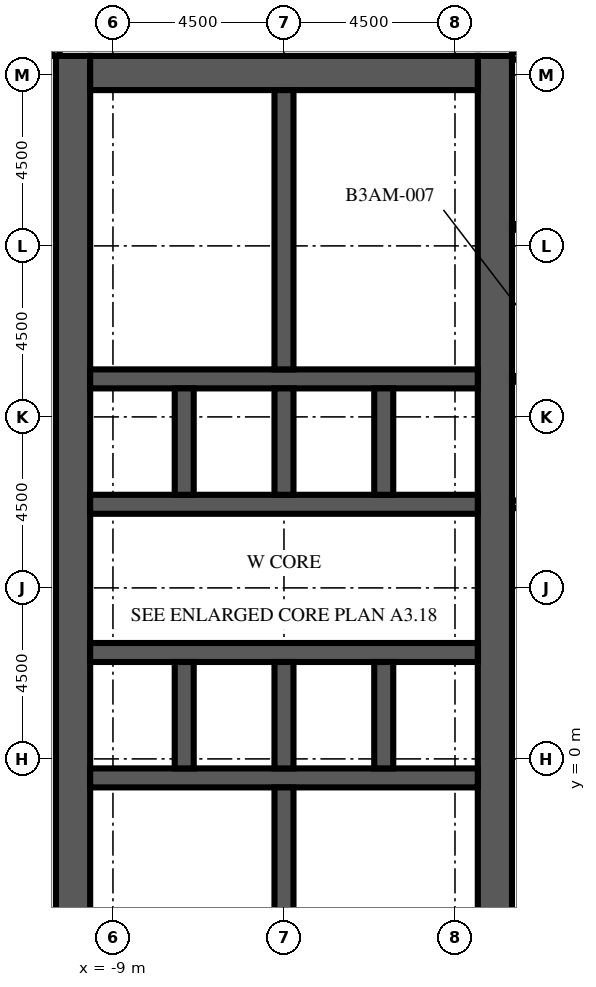
"""IFC4 building model, lengths in metres.
Left out: names, types, materials, properties, quantities, classifications, styles, units other than length and angle.
Written with IfcOpenShell. Run it as: python <this file> out.ifc"""

import sys

from ifc_helpers import new_model, si_unit, direction, frame, frame_2d, origin, place, context, subcontext, project, spatial, rectangle, extrude, element, fill, save


model = new_model("IFC4")
c1 = context("Model", 3, precision=1e-05, world=origin(), true_north=direction((0.0, 1.0)))
c2 = subcontext(c1, "Body", "Model", "MODEL_VIEW")
j1 = project(units=[si_unit("LENGTHUNIT", "METRE"), si_unit("PLANEANGLEUNIT", "RADIAN")], contexts=[c1])
p1 = place(None, origin())
s1 = spatial("IfcSite", under=j1, at=p1, CompositionType="ELEMENT")
p2 = place(p1, origin())
s2 = spatial("IfcBuilding", under=s1, at=p2, CompositionType="ELEMENT")
p3 = place(p2, frame((0.0, 0.0, 110.7)))
s3 = spatial("IfcBuildingStorey", under=s2, at=p3, CompositionType="ELEMENT", Elevation=110.7)
p4 = place(p3, frame((-10.05, -9.0, 0.0), z_axis=(0.0, 0.0, 1.0), x_axis=(0.0, 1.0, 0.0)))
e1 = element("IfcWall", 1, at=p4, inside=s3, PredefinedType="SHEAR", context=c2, shape_type="SweptSolid", body=[
    extrude(rectangle(XDim=27.5, YDim=0.9, at=frame_2d((13.75, 0.0))), origin(), (0.0, 0.0, 1.0), 6.0),
])
p5 = place(p4, frame((12.55, 0.0, 0.0)))
e2 = element("IfcOpeningElement", 2, at=p5, cuts=e1, PredefinedType="OPENING", context=c2, shape_type="SweptSolid", body=[
    extrude(rectangle(XDim=2.4, YDim=2.4, at=frame_2d((1.2, 1.2))), frame((0.0, 0.46, 0.0), z_axis=(0.0, -1.0, 0.0), x_axis=(1.0, 0.0, 0.0)), (0.0, 0.0, 1.0), 0.92),
])
p6 = place(p4, frame((6.825, 0.0, 0.0)))
e3 = element("IfcOpeningElement", 3, at=p6, cuts=e1, PredefinedType="OPENING", context=c2, shape_type="SweptSolid", body=[
    extrude(rectangle(XDim=1.2, YDim=2.1, at=frame_2d((0.6, 1.05))), frame((0.0, 0.46, 0.0), z_axis=(0.0, -1.0, 0.0), x_axis=(1.0, 0.0, 0.0)), (0.0, 0.0, 1.0), 0.92),
])
p7 = place(p4, frame((19.475, 0.0, 0.0)))
e4 = element("IfcOpeningElement", 4, at=p7, cuts=e1, PredefinedType="OPENING", context=c2, shape_type="SweptSolid", body=[
    extrude(rectangle(XDim=1.2, YDim=2.1, at=frame_2d((0.6, 1.05))), frame((0.0, 0.46, 0.0), z_axis=(0.0, -1.0, 0.0), x_axis=(1.0, 0.0, 0.0)), (0.0, 0.0, 1.0), 0.92),
])
p8 = place(p3, frame((1.05, -9.0, 0.0), z_axis=(0.0, 0.0, 1.0), x_axis=(0.0, 1.0, 0.0)))
e5 = element("IfcWall", 5, at=p8, inside=s3, PredefinedType="SHEAR", context=c2, shape_type="SweptSolid", body=[
    extrude(rectangle(XDim=27.5, YDim=0.9, at=frame_2d((13.75, 0.0))), origin(), (0.0, 0.0, 1.0), 6.0),
])
p9 = place(p8, frame((12.55, 0.0, 0.0)))
e6 = element("IfcOpeningElement", 6, at=p9, cuts=e5, PredefinedType="OPENING", context=c2, shape_type="SweptSolid", body=[
    extrude(rectangle(XDim=2.4, YDim=2.4, at=frame_2d((1.2, 1.2))), frame((0.0, 0.46, 0.0), z_axis=(0.0, -1.0, 0.0), x_axis=(1.0, 0.0, 0.0)), (0.0, 0.0, 1.0), 0.92),
])
p10 = place(p8, frame((3.975, 0.0, 0.0)))
e7 = element("IfcOpeningElement", 7, at=p10, cuts=e5, PredefinedType="OPENING", context=c2, shape_type="SweptSolid", body=[
    extrude(rectangle(XDim=1.2, YDim=2.1, at=frame_2d((0.6, 1.05))), frame((0.0, 0.46, 0.0), z_axis=(0.0, -1.0, 0.0), x_axis=(1.0, 0.0, 0.0)), (0.0, 0.0, 1.0), 0.92),
])
p11 = place(p8, frame((19.485, 0.0, 0.0)))
e8 = element("IfcOpeningElement", 8, at=p11, cuts=e5, PredefinedType="OPENING", context=c2, shape_type="SweptSolid", body=[
    extrude(rectangle(XDim=1.0, YDim=2.1, at=frame_2d((0.5, 1.05))), frame((0.0, 0.46, 0.0), z_axis=(0.0, -1.0, 0.0), x_axis=(1.0, 0.0, 0.0)), (0.0, 0.0, 1.0), 0.92),
])
p12 = place(p8, frame((21.139, 0.0, 0.0)))
e9 = element("IfcOpeningElement", 9, at=p12, cuts=e5, PredefinedType="OPENING", context=c2, shape_type="SweptSolid", body=[
    extrude(rectangle(XDim=1.0, YDim=2.1, at=frame_2d((0.5, 1.05))), frame((0.0, 0.46, 0.0), z_axis=(0.0, -1.0, 0.0), x_axis=(1.0, 0.0, 0.0)), (0.0, 0.0, 1.0), 0.92),
])
p13 = place(p8, frame((23.16, 0.0, 0.0)))
e10 = element("IfcOpeningElement", 10, at=p13, cuts=e5, PredefinedType="OPENING", context=c2, shape_type="SweptSolid", body=[
    extrude(rectangle(XDim=1.0, YDim=2.1, at=frame_2d((0.5, 1.05))), frame((0.0, 0.46, 0.0), z_axis=(0.0, -1.0, 0.0), x_axis=(1.0, 0.0, 0.0)), (0.0, 0.0, 1.0), 0.92),
])
p14 = place(p8, frame((25.181, 0.0, 0.0)))
e11 = element("IfcOpeningElement", 11, at=p14, cuts=e5, PredefinedType="OPENING", context=c2, shape_type="SweptSolid", body=[
    extrude(rectangle(XDim=1.0, YDim=2.1, at=frame_2d((0.5, 1.05))), frame((0.0, 0.46, 0.0), z_axis=(0.0, -1.0, 0.0), x_axis=(1.0, 0.0, 0.0)), (0.0, 0.0, 1.0), 0.92),
])
p15 = place(p3, frame((-9.6, 18.05, 0.0), z_axis=(0.0, 0.0, 1.0), x_axis=(1.0, 0.0, 0.0)))
e12 = element("IfcWall", 12, at=p15, inside=s3, PredefinedType="SHEAR", context=c2, shape_type="SweptSolid", body=[
    extrude(rectangle(XDim=10.2, YDim=0.9, at=frame_2d((5.1, 0.0))), origin(), (0.0, 0.0, 1.0), 6.0),
])
p16 = place(p3, frame((-9.6, -0.5, 0.0), z_axis=(0.0, 0.0, 1.0), x_axis=(1.0, 0.0, 0.0)))
e13 = element("IfcWall", 13, at=p16, inside=s3, PredefinedType="SHEAR", context=c2, shape_type="SweptSolid", body=[
    extrude(rectangle(XDim=10.2, YDim=0.5, at=frame_2d((5.1, 0.0))), origin(), (0.0, 0.0, 1.0), 6.0),
])
p17 = place(p3, frame((-9.6, 2.8, 0.0), z_axis=(0.0, 0.0, 1.0), x_axis=(1.0, 0.0, 0.0)))
e14 = element("IfcWall", 14, at=p17, inside=s3, PredefinedType="SHEAR", context=c2, shape_type="SweptSolid", body=[
    extrude(rectangle(XDim=10.2, YDim=0.5, at=frame_2d((5.1, 0.0))), origin(), (0.0, 0.0, 1.0), 6.0),
])
p18 = place(p17, frame((0.562, 0.0, 0.0)))
e15 = element("IfcOpeningElement", 15, at=p18, cuts=e14, PredefinedType="OPENING", context=c2, shape_type="SweptSolid", body=[
    extrude(rectangle(XDim=1.1, YDim=2.1, at=frame_2d((0.55, 1.05))), frame((0.0, 0.26, 0.0), z_axis=(0.0, -1.0, 0.0), x_axis=(1.0, 0.0, 0.0)), (0.0, 0.0, 1.0), 0.52),
])
p19 = place(p17, frame((3.238, 0.0, 0.0)))
e16 = element("IfcOpeningElement", 16, at=p19, cuts=e14, PredefinedType="OPENING", context=c2, shape_type="SweptSolid", body=[
    extrude(rectangle(XDim=1.1, YDim=2.1, at=frame_2d((0.55, 1.05))), frame((0.0, 0.26, 0.0), z_axis=(0.0, -1.0, 0.0), x_axis=(1.0, 0.0, 0.0)), (0.0, 0.0, 1.0), 0.52),
])
p20 = place(p17, frame((8.538, 0.0, 0.0)))
e17 = element("IfcOpeningElement", 17, at=p20, cuts=e14, PredefinedType="OPENING", context=c2, shape_type="SweptSolid", body=[
    extrude(rectangle(XDim=1.1, YDim=2.1, at=frame_2d((0.55, 1.05))), frame((0.0, 0.26, 0.0), z_axis=(0.0, -1.0, 0.0), x_axis=(1.0, 0.0, 0.0)), (0.0, 0.0, 1.0), 0.52),
])
p21 = place(p3, frame((-9.6, 6.7, 0.0), z_axis=(0.0, 0.0, 1.0), x_axis=(1.0, 0.0, 0.0)))
e18 = element("IfcWall", 18, at=p21, inside=s3, PredefinedType="SHEAR", context=c2, shape_type="SweptSolid", body=[
    extrude(rectangle(XDim=10.2, YDim=0.5, at=frame_2d((5.1, 0.0))), origin(), (0.0, 0.0, 1.0), 6.0),
])
p22 = place(p21, frame((0.562, 0.0, 0.0)))
e19 = element("IfcOpeningElement", 19, at=p22, cuts=e18, PredefinedType="OPENING", context=c2, shape_type="SweptSolid", body=[
    extrude(rectangle(XDim=1.1, YDim=2.1, at=frame_2d((0.55, 1.05))), frame((0.0, 0.26, 0.0), z_axis=(0.0, -1.0, 0.0), x_axis=(1.0, 0.0, 0.0)), (0.0, 0.0, 1.0), 0.52),
])
p23 = place(p21, frame((3.288, 0.0, 0.0)))
e20 = element("IfcOpeningElement", 20, at=p23, cuts=e18, PredefinedType="OPENING", context=c2, shape_type="SweptSolid", body=[
    extrude(rectangle(XDim=1.0, YDim=2.1, at=frame_2d((0.5, 1.05))), frame((0.0, 0.26, 0.0), z_axis=(0.0, -1.0, 0.0), x_axis=(1.0, 0.0, 0.0)), (0.0, 0.0, 1.0), 0.52),
])
p24 = place(p21, frame((5.913, 0.0, 0.0)))
e21 = element("IfcOpeningElement", 21, at=p24, cuts=e18, PredefinedType="OPENING", context=c2, shape_type="SweptSolid", body=[
    extrude(rectangle(XDim=1.0, YDim=2.1, at=frame_2d((0.5, 1.05))), frame((0.0, 0.26, 0.0), z_axis=(0.0, -1.0, 0.0), x_axis=(1.0, 0.0, 0.0)), (0.0, 0.0, 1.0), 0.52),
])
p25 = place(p21, frame((8.587, 0.0, 0.0)))
e22 = element("IfcOpeningElement", 22, at=p25, cuts=e18, PredefinedType="OPENING", context=c2, shape_type="SweptSolid", body=[
    extrude(rectangle(XDim=1.0, YDim=2.1, at=frame_2d((0.5, 1.05))), frame((0.0, 0.26, 0.0), z_axis=(0.0, -1.0, 0.0), x_axis=(1.0, 0.0, 0.0)), (0.0, 0.0, 1.0), 0.52),
])
p26 = place(p3, frame((-9.6, 10.0, 0.0), z_axis=(0.0, 0.0, 1.0), x_axis=(1.0, 0.0, 0.0)))
e23 = element("IfcWall", 23, at=p26, inside=s3, PredefinedType="SHEAR", context=c2, shape_type="SweptSolid", body=[
    extrude(rectangle(XDim=10.2, YDim=0.5, at=frame_2d((5.1, 0.0))), origin(), (0.0, 0.0, 1.0), 6.0),
])
for number, where, z_axis, x_axis in (
    (24, (-7.125, -0.25, 0.0), (0.0, 0.0, 1.0), (0.0, 1.0, 0.0)),
    (25, (-7.125, 6.95, 0.0), (0.0, 0.0, 1.0), (0.0, 1.0, 0.0)),
    (26, (-4.5, -0.25, 0.0), (0.0, 0.0, 1.0), (0.0, 1.0, 0.0)),
    (27, (-4.5, 6.95, 0.0), (0.0, 0.0, 1.0), (0.0, 1.0, 0.0)),
    (28, (-1.875, -0.25, 0.0), (0.0, 0.0, 1.0), (0.0, 1.0, 0.0)),
    (29, (-1.875, 6.95, 0.0), (0.0, 0.0, 1.0), (0.0, 1.0, 0.0)),
):
    element("IfcWall", number, at=place(p3, frame(where, z_axis=z_axis, x_axis=x_axis)), inside=s3, PredefinedType="SHEAR", context=c2, shape_type="SweptSolid", body=[
        extrude(rectangle(XDim=2.8, YDim=0.5, at=frame_2d((1.4, 0.0))), origin(), (0.0, 0.0, 1.0), 6.0),
    ])
for number, where, z_axis, x_axis in (
    (30, (-4.5, -8.1, 0.0), (0.0, 0.0, 1.0), (0.0, 1.0, 0.0)),
    (31, (-4.5, 10.25, 0.0), (0.0, 0.0, 1.0), (0.0, 1.0, 0.0)),
):
    element("IfcWall", number, at=place(p3, frame(where, z_axis=z_axis, x_axis=x_axis)), inside=s3, PredefinedType="SHEAR", context=c2, shape_type="SweptSolid", body=[
        extrude(rectangle(XDim=7.35, YDim=0.5, at=frame_2d((3.675, 0.0))), origin(), (0.0, 0.0, 1.0), 6.0),
    ])
p27 = place(p3, frame((-1.0, -2.955, 0.0), z_axis=(0.0, 0.0, 1.0), x_axis=(1.0, 0.0, 0.0)))
e32 = element("IfcWall", 32, at=p27, inside=s3, PredefinedType="PARTITIONING", context=c2, shape_type="SweptSolid", body=[
    extrude(rectangle(XDim=1.6, YDim=0.1, at=frame_2d((0.8, 0.0))), origin(), (0.0, 0.0, 1.0), 5.55),
])
p28 = place(p27, frame((0.3, 0.0, 0.0)))
e33 = element("IfcOpeningElement", 33, at=p28, cuts=e32, PredefinedType="OPENING", context=c2, shape_type="SweptSolid", body=[
    extrude(rectangle(XDim=1.0, YDim=2.1, at=frame_2d((0.5, 1.05))), frame((0.0, 0.06, 0.0), z_axis=(0.0, -1.0, 0.0), x_axis=(1.0, 0.0, 0.0)), (0.0, 0.0, 1.0), 0.12),
])
p29 = place(p3, frame((-1.0, -5.895, 0.0), z_axis=(0.0, 0.0, 1.0), x_axis=(0.0, 1.0, 0.0)))
e34 = element("IfcWall", 34, at=p29, inside=s3, PredefinedType="PARTITIONING", context=c2, shape_type="SweptSolid", body=[
    extrude(rectangle(XDim=2.94, YDim=0.1, at=frame_2d((1.47, 0.0))), origin(), (0.0, 0.0, 1.0), 5.55),
])
p30 = place(p29, frame((0.97, 0.0, 0.0)))
e35 = element("IfcOpeningElement", 35, at=p30, cuts=e34, PredefinedType="OPENING", context=c2, shape_type="SweptSolid", body=[
    extrude(rectangle(XDim=1.0, YDim=2.1, at=frame_2d((0.5, 1.05))), frame((0.0, 0.06, 0.0), z_axis=(0.0, -1.0, 0.0), x_axis=(1.0, 0.0, 0.0)), (0.0, 0.0, 1.0), 0.12),
])
p31 = place(p3, frame((-4.25, -2.955, 0.0), z_axis=(0.0, 0.0, 1.0), x_axis=(1.0, 0.0, 0.0)))
e36 = element("IfcWall", 36, at=p31, inside=s3, PredefinedType="PARTITIONING", context=c2, shape_type="SweptSolid", body=[
    extrude(rectangle(XDim=3.25, YDim=0.1, at=frame_2d((1.625, 0.0))), origin(), (0.0, 0.0, 1.0), 5.55),
])
for number, where, z_axis, x_axis in (
    (37, (-4.25, 11.72, 0.0), (0.0, 0.0, 1.0), (1.0, 0.0, 0.0)),
    (38, (-4.25, 13.558, 0.0), (0.0, 0.0, 1.0), (1.0, 0.0, 0.0)),
    (39, (-4.25, 15.762, 0.0), (0.0, 0.0, 1.0), (1.0, 0.0, 0.0)),
):
    element("IfcWall", number, at=place(p3, frame(where, z_axis=z_axis, x_axis=x_axis)), inside=s3, PredefinedType="PARTITIONING", context=c2, shape_type="SweptSolid", body=[
        extrude(rectangle(XDim=4.85, YDim=0.1, at=frame_2d((2.425, 0.0))), origin(), (0.0, 0.0, 1.0), 5.55),
    ])
p32 = place(p3, frame((-10.5, 26.55, 0.0), z_axis=(0.0, 0.0, 1.0), x_axis=(0.0, -1.0, 0.0)))
e40 = element("IfcWall", 40, at=p32, inside=s3, PredefinedType="PARTITIONING", context=c2, shape_type="SweptSolid", body=[
    extrude(rectangle(XDim=8.05, YDim=0.2, at=frame_2d((4.025, 0.0))), origin(), (0.0, 0.0, 1.0), 5.55),
])
p33 = place(p32, frame((0.45, 0.0, 0.0)))
e41 = element("IfcOpeningElement", 41, at=p33, cuts=e40, PredefinedType="OPENING", context=c2, shape_type="SweptSolid", body=[
    extrude(rectangle(XDim=1.0, YDim=2.1, at=frame_2d((0.5, 1.05))), frame((0.0, 0.11, 0.0), z_axis=(0.0, -1.0, 0.0), x_axis=(1.0, 0.0, 0.0)), (0.0, 0.0, 1.0), 0.22),
])
p34 = place(p3, frame((1.5, 6.7, 0.0), z_axis=(0.0, 0.0, 1.0), x_axis=(1.0, 0.0, 0.0)))
e42 = element("IfcWall", 42, at=p34, inside=s3, PredefinedType="PARTITIONING", context=c2, shape_type="SweptSolid", body=[
    extrude(rectangle(XDim=4.5, YDim=0.2, at=frame_2d((2.25, 0.0))), origin(), (0.0, 0.0, 1.0), 5.55),
])
p35 = place(p34, frame((2.35, 0.0, 0.0)))
e43 = element("IfcOpeningElement", 43, at=p35, cuts=e42, PredefinedType="OPENING", context=c2, shape_type="SweptSolid", body=[
    extrude(rectangle(XDim=1.0, YDim=2.1, at=frame_2d((0.5, 1.05))), frame((0.0, 0.11, 0.0), z_axis=(0.0, -1.0, 0.0), x_axis=(1.0, 0.0, 0.0)), (0.0, 0.0, 1.0), 0.22),
])
p36 = place(p3, frame((1.5, 10.0, 0.0), z_axis=(0.0, 0.0, 1.0), x_axis=(1.0, 0.0, 0.0)))
e44 = element("IfcWall", 44, at=p36, inside=s3, PredefinedType="PARTITIONING", context=c2, shape_type="SweptSolid", body=[
    extrude(rectangle(XDim=4.5, YDim=0.15, at=frame_2d((2.25, 0.0))), origin(), (0.0, 0.0, 1.0), 5.55),
])
p37 = place(p36, frame((1.1, 0.0, 0.0)))
e45 = element("IfcOpeningElement", 45, at=p37, cuts=e44, PredefinedType="OPENING", context=c2, shape_type="SweptSolid", body=[
    extrude(rectangle(XDim=1.0, YDim=2.1, at=frame_2d((0.5, 1.05))), frame((0.0, 0.085, 0.0), z_axis=(0.0, -1.0, 0.0), x_axis=(1.0, 0.0, 0.0)), (0.0, 0.0, 1.0), 0.17),
])
p38 = place(p3, frame((1.5, 14.0, 0.0), z_axis=(0.0, 0.0, 1.0), x_axis=(1.0, 0.0, 0.0)))
e46 = element("IfcWall", 46, at=p38, inside=s3, PredefinedType="PARTITIONING", context=c2, shape_type="SweptSolid", body=[
    extrude(rectangle(XDim=4.5, YDim=0.15, at=frame_2d((2.25, 0.0))), origin(), (0.0, 0.0, 1.0), 5.55),
])
p39 = place(p38, frame((1.35, 0.0, 0.0)))
e47 = element("IfcOpeningElement", 47, at=p39, cuts=e46, PredefinedType="OPENING", context=c2, shape_type="SweptSolid", body=[
    extrude(rectangle(XDim=1.0, YDim=2.1, at=frame_2d((0.5, 1.05))), frame((0.0, 0.085, 0.0), z_axis=(0.0, -1.0, 0.0), x_axis=(1.0, 0.0, 0.0)), (0.0, 0.0, 1.0), 0.17),
])
p40 = place(p3, frame((1.5, 18.5, 0.0), z_axis=(0.0, 0.0, 1.0), x_axis=(1.0, 0.0, 0.0)))
e48 = element("IfcWall", 48, at=p40, inside=s3, PredefinedType="PARTITIONING", context=c2, shape_type="SweptSolid", body=[
    extrude(rectangle(XDim=4.5, YDim=0.2, at=frame_2d((2.25, 0.0))), origin(), (0.0, 0.0, 1.0), 5.55),
])
p41 = place(p18, origin())
e49 = element("IfcDoor", 49, at=p41, inside=s3, OperationType="DOUBLE_DOOR_SLIDING", PredefinedType="DOOR", context=c2, shape_type="SweptSolid", body=[
    extrude(rectangle(XDim=1.1, YDim=2.1, at=frame_2d((0.55, 1.05))), frame((0.0, 0.025, 0.0), z_axis=(0.0, -1.0, 0.0), x_axis=(1.0, 0.0, 0.0)), (0.0, 0.0, 1.0), 0.05),
])
fill(e15, e49)
p42 = place(p19, origin())
e50 = element("IfcDoor", 50, at=p42, inside=s3, OperationType="DOUBLE_DOOR_SLIDING", PredefinedType="DOOR", context=c2, shape_type="SweptSolid", body=[
    extrude(rectangle(XDim=1.1, YDim=2.1, at=frame_2d((0.55, 1.05))), frame((0.0, 0.025, 0.0), z_axis=(0.0, -1.0, 0.0), x_axis=(1.0, 0.0, 0.0)), (0.0, 0.0, 1.0), 0.05),
])
fill(e16, e50)
p43 = place(p20, origin())
e51 = element("IfcDoor", 51, at=p43, inside=s3, OperationType="DOUBLE_DOOR_SLIDING", PredefinedType="DOOR", context=c2, shape_type="SweptSolid", body=[
    extrude(rectangle(XDim=1.1, YDim=2.1, at=frame_2d((0.55, 1.05))), frame((0.0, 0.025, 0.0), z_axis=(0.0, -1.0, 0.0), x_axis=(1.0, 0.0, 0.0)), (0.0, 0.0, 1.0), 0.05),
])
fill(e17, e51)
p44 = place(p22, origin())
e52 = element("IfcDoor", 52, at=p44, inside=s3, OperationType="DOUBLE_DOOR_SLIDING", PredefinedType="DOOR", context=c2, shape_type="SweptSolid", body=[
    extrude(rectangle(XDim=1.1, YDim=2.1, at=frame_2d((0.55, 1.05))), frame((0.0, 0.025, 0.0), z_axis=(0.0, -1.0, 0.0), x_axis=(1.0, 0.0, 0.0)), (0.0, 0.0, 1.0), 0.05),
])
fill(e19, e52)
p45 = place(p5, origin())
e53 = element("IfcDoor", 53, at=p45, inside=s3, OperationType="DOUBLE_DOOR_DOUBLE_SWING", PredefinedType="DOOR", context=c2, shape_type="SweptSolid", body=[
    extrude(rectangle(XDim=2.4, YDim=2.4, at=frame_2d((1.2, 1.2))), frame((0.0, 0.025, 0.0), z_axis=(0.0, -1.0, 0.0), x_axis=(1.0, 0.0, 0.0)), (0.0, 0.0, 1.0), 0.05),
])
fill(e2, e53)
p46 = place(p9, origin())
e54 = element("IfcDoor", 54, at=p46, inside=s3, OperationType="DOUBLE_DOOR_DOUBLE_SWING", PredefinedType="DOOR", context=c2, shape_type="SweptSolid", body=[
    extrude(rectangle(XDim=2.4, YDim=2.4, at=frame_2d((1.2, 1.2))), frame((0.0, 0.025, 0.0), z_axis=(0.0, -1.0, 0.0), x_axis=(1.0, 0.0, 0.0)), (0.0, 0.0, 1.0), 0.05),
])
fill(e6, e54)
p47 = place(p6, origin())
e55 = element("IfcDoor", 55, at=p47, inside=s3, OperationType="SINGLE_SWING_LEFT", PredefinedType="DOOR", context=c2, shape_type="SweptSolid", body=[
    extrude(rectangle(XDim=1.2, YDim=2.1, at=frame_2d((0.6, 1.05))), frame((0.0, 0.025, 0.0), z_axis=(0.0, -1.0, 0.0), x_axis=(1.0, 0.0, 0.0)), (0.0, 0.0, 1.0), 0.05),
])
fill(e3, e55)
p48 = place(p7, origin())
e56 = element("IfcDoor", 56, at=p48, inside=s3, OperationType="SINGLE_SWING_LEFT", PredefinedType="DOOR", context=c2, shape_type="SweptSolid", body=[
    extrude(rectangle(XDim=1.2, YDim=2.1, at=frame_2d((0.6, 1.05))), frame((0.0, 0.025, 0.0), z_axis=(0.0, -1.0, 0.0), x_axis=(1.0, 0.0, 0.0)), (0.0, 0.0, 1.0), 0.05),
])
fill(e4, e56)
p49 = place(p23, origin())
e57 = element("IfcDoor", 57, at=p49, inside=s3, OperationType="SINGLE_SWING_RIGHT", PredefinedType="DOOR", context=c2, shape_type="SweptSolid", body=[
    extrude(rectangle(XDim=1.0, YDim=2.1, at=frame_2d((0.5, 1.05))), frame((0.0, 0.025, 0.0), z_axis=(0.0, -1.0, 0.0), x_axis=(1.0, 0.0, 0.0)), (0.0, 0.0, 1.0), 0.05),
])
fill(e20, e57)
p50 = place(p24, origin())
e58 = element("IfcDoor", 58, at=p50, inside=s3, OperationType="SINGLE_SWING_LEFT", PredefinedType="DOOR", context=c2, shape_type="SweptSolid", body=[
    extrude(rectangle(XDim=1.0, YDim=2.1, at=frame_2d((0.5, 1.05))), frame((0.0, 0.025, 0.0), z_axis=(0.0, -1.0, 0.0), x_axis=(1.0, 0.0, 0.0)), (0.0, 0.0, 1.0), 0.05),
])
fill(e21, e58)
p51 = place(p25, origin())
e59 = element("IfcDoor", 59, at=p51, inside=s3, OperationType="SINGLE_SWING_RIGHT", PredefinedType="DOOR", context=c2, shape_type="SweptSolid", body=[
    extrude(rectangle(XDim=1.0, YDim=2.1, at=frame_2d((0.5, 1.05))), frame((0.0, 0.025, 0.0), z_axis=(0.0, -1.0, 0.0), x_axis=(1.0, 0.0, 0.0)), (0.0, 0.0, 1.0), 0.05),
])
fill(e22, e59)
p52 = place(p10, origin())
e60 = element("IfcDoor", 60, at=p52, inside=s3, OperationType="SINGLE_SWING_LEFT", PredefinedType="DOOR", context=c2, shape_type="SweptSolid", body=[
    extrude(rectangle(XDim=1.2, YDim=2.1, at=frame_2d((0.6, 1.05))), frame((0.0, 0.425, 0.0), z_axis=(0.0, -1.0, 0.0), x_axis=(1.0, 0.0, 0.0)), (0.0, 0.0, 1.0), 0.05),
])
fill(e7, e60)
p53 = place(p28, origin())
e61 = element("IfcDoor", 61, at=p53, inside=s3, OperationType="SINGLE_SWING_LEFT", PredefinedType="DOOR", context=c2, shape_type="SweptSolid", body=[
    extrude(rectangle(XDim=1.0, YDim=2.1, at=frame_2d((0.5, 1.05))), frame((0.0, 0.025, 0.0), z_axis=(0.0, -1.0, 0.0), x_axis=(1.0, 0.0, 0.0)), (0.0, 0.0, 1.0), 0.05),
])
fill(e33, e61)
p54 = place(p11, origin())
e62 = element("IfcDoor", 62, at=p54, inside=s3, OperationType="SINGLE_SWING_LEFT", PredefinedType="DOOR", context=c2, shape_type="SweptSolid", body=[
    extrude(rectangle(XDim=1.0, YDim=2.1, at=frame_2d((0.5, 1.05))), frame((0.0, 0.425, 0.0), z_axis=(0.0, -1.0, 0.0), x_axis=(1.0, 0.0, 0.0)), (0.0, 0.0, 1.0), 0.05),
])
fill(e8, e62)
p55 = place(p12, origin())
e63 = element("IfcDoor", 63, at=p55, inside=s3, OperationType="SINGLE_SWING_RIGHT", PredefinedType="DOOR", context=c2, shape_type="SweptSolid", body=[
    extrude(rectangle(XDim=1.0, YDim=2.1, at=frame_2d((0.5, 1.05))), frame((0.0, 0.425, 0.0), z_axis=(0.0, -1.0, 0.0), x_axis=(1.0, 0.0, 0.0)), (0.0, 0.0, 1.0), 0.05),
])
fill(e9, e63)
p56 = place(p13, origin())
e64 = element("IfcDoor", 64, at=p56, inside=s3, OperationType="SINGLE_SWING_LEFT", PredefinedType="DOOR", context=c2, shape_type="SweptSolid", body=[
    extrude(rectangle(XDim=1.0, YDim=2.1, at=frame_2d((0.5, 1.05))), frame((0.0, 0.425, 0.0), z_axis=(0.0, -1.0, 0.0), x_axis=(1.0, 0.0, 0.0)), (0.0, 0.0, 1.0), 0.05),
])
fill(e10, e64)
p57 = place(p14, origin())
e65 = element("IfcDoor", 65, at=p57, inside=s3, OperationType="SINGLE_SWING_RIGHT", PredefinedType="DOOR", context=c2, shape_type="SweptSolid", body=[
    extrude(rectangle(XDim=1.0, YDim=2.1, at=frame_2d((0.5, 1.05))), frame((0.0, 0.425, 0.0), z_axis=(0.0, -1.0, 0.0), x_axis=(1.0, 0.0, 0.0)), (0.0, 0.0, 1.0), 0.05),
])
fill(e11, e65)
save(model, sys.argv[1])
